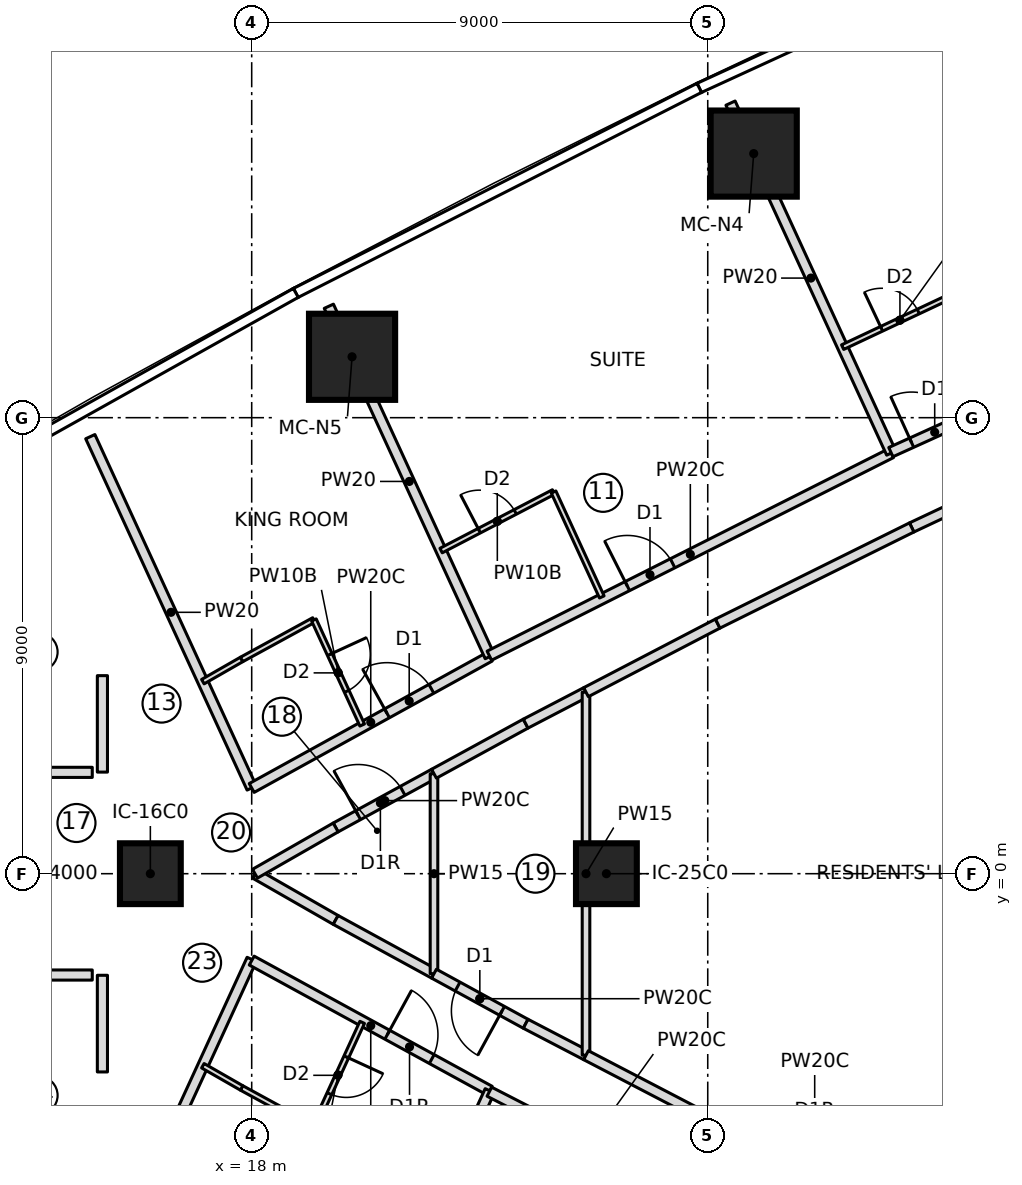
"""IFC4 building model, lengths in metres.
Left out: names, types, materials, properties, quantities, classifications, styles, units other than length and angle.
Written with IfcOpenShell. Run it as: python <this file> out.ifc"""

import sys

from ifc_helpers import new_model, si_unit, direction, frame, frame_2d, origin, origin_2d, place, context, subcontext, project, spatial, rectangle, extrude, element, fill, save


model = new_model("IFC4")
c1 = context("Model", 3, precision=1e-05, world=origin(), true_north=direction((0.0, 1.0)))
c2 = subcontext(c1, "Body", "Model", "MODEL_VIEW")
j1 = project(units=[si_unit("LENGTHUNIT", "METRE"), si_unit("PLANEANGLEUNIT", "RADIAN")], contexts=[c1])
p1 = place(None, origin())
s1 = spatial("IfcSite", under=j1, at=p1, CompositionType="ELEMENT")
p2 = place(p1, origin())
s2 = spatial("IfcBuilding", under=s1, at=p2, CompositionType="ELEMENT")
p3 = place(p2, frame((0.0, 0.0, 99.1)))
s3 = spatial("IfcBuildingStorey", under=s2, at=p3, CompositionType="ELEMENT", Elevation=99.1)
for number, where, z_axis, x_axis in (
    (1, (27.907, 14.212, 0.0), (0.0, 0.0, 1.0), (1.0, 0.0, 0.0)),
    (2, (19.981, 10.202, 0.0), (0.0, 0.0, 1.0), (1.0, 0.0, 0.0)),
):
    element("IfcColumn", number, at=place(p3, frame(where, z_axis=z_axis, x_axis=x_axis)), inside=s3, PredefinedType="COLUMN", context=c2, shape_type="SweptSolid", body=[
        extrude(rectangle(XDim=1.7, YDim=1.7, at=origin_2d()), origin(), (0.0, 0.0, 1.0), 3.55),
    ])
for number, where, z_axis, x_axis in (
    (3, (16.0, 0.0, 0.0), (0.0, 0.0, 1.0), (1.0, 0.0, 0.0)),
    (4, (25.0, 0.0, 0.0), (0.0, 0.0, 1.0), (1.0, 0.0, 0.0)),
):
    element("IfcColumn", number, at=place(p3, frame(where, z_axis=z_axis, x_axis=x_axis)), inside=s3, PredefinedType="COLUMN", context=c2, shape_type="SweptSolid", body=[
        extrude(rectangle(XDim=1.2, YDim=1.2, at=origin_2d()), origin(), (0.0, 0.0, 1.0), 3.55),
    ])
p4 = place(p3, frame((11.685, 2.0, 0.0), z_axis=(0.0, 0.0, 1.0), x_axis=(1.0, 0.0, 0.0)))
e5 = element("IfcWall", 5, at=p4, inside=s3, PredefinedType="PARTITIONING", context=c2, shape_type="SweptSolid", body=[
    extrude(rectangle(XDim=3.168, YDim=0.2, at=frame_2d((1.584, 0.0))), origin(), (0.0, 0.0, 1.0), 3.25),
])
p5 = place(p4, frame((1.084, 0.0, 0.0)))
e6 = element("IfcOpeningElement", 6, at=p5, cuts=e5, PredefinedType="OPENING", context=c2, shape_type="SweptSolid", body=[
    extrude(rectangle(XDim=1.0, YDim=2.1, at=frame_2d((0.5, 1.05))), frame((0.0, 0.11, 0.0), z_axis=(0.0, -1.0, 0.0), x_axis=(1.0, 0.0, 0.0)), (0.0, 0.0, 1.0), 0.22),
])
p6 = place(p3, frame((11.685, -2.0, 0.0), z_axis=(0.0, 0.0, 1.0), x_axis=(1.0, 0.0, 0.0)))
e7 = element("IfcWall", 7, at=p6, inside=s3, PredefinedType="PARTITIONING", context=c2, shape_type="SweptSolid", body=[
    extrude(rectangle(XDim=3.168, YDim=0.2, at=frame_2d((1.584, 0.0))), origin(), (0.0, 0.0, 1.0), 3.25),
])
p7 = place(p6, frame((1.084, 0.0, 0.0)))
e8 = element("IfcOpeningElement", 8, at=p7, cuts=e7, PredefinedType="OPENING", context=c2, shape_type="SweptSolid", body=[
    extrude(rectangle(XDim=1.0, YDim=2.1, at=frame_2d((0.5, 1.05))), frame((0.0, 0.11, 0.0), z_axis=(0.0, -1.0, 0.0), x_axis=(1.0, 0.0, 0.0)), (0.0, 0.0, 1.0), 0.22),
])
p8 = place(p3, frame((14.815, 8.626, 0.0), z_axis=(0.0, 0.0, 1.0), x_axis=(0.417432341259, -0.908708006166, 0.0)))
e9 = element("IfcWall", 9, at=p8, inside=s3, PredefinedType="PARTITIONING", context=c2, shape_type="SweptSolid", body=[
    extrude(rectangle(XDim=7.631, YDim=0.2, at=frame_2d((3.815, 0.0))), origin(), (0.0, 0.0, 1.0), 3.25),
])
p9 = place(p3, frame((18.0, 1.692, 0.0), z_axis=(0.0, 0.0, 1.0), x_axis=(0.875548487611, 0.483130257634, 0.0)))
e10 = element("IfcWall", 10, at=p9, inside=s3, PredefinedType="PARTITIONING", context=c2, shape_type="SweptSolid", body=[
    extrude(rectangle(XDim=5.367, YDim=0.2, at=frame_2d((2.683, 0.0))), origin(), (0.0, 0.0, 1.0), 3.25),
])
p10 = place(p9, frame((3.05, 0.0, 0.0)))
e11 = element("IfcOpeningElement", 11, at=p10, cuts=e10, PredefinedType="OPENING", context=c2, shape_type="SweptSolid", body=[
    extrude(rectangle(XDim=1.0, YDim=2.1, at=frame_2d((0.5, 1.05))), frame((0.0, 0.11, 0.0), z_axis=(0.0, -1.0, 0.0), x_axis=(1.0, 0.0, 0.0)), (0.0, 0.0, 1.0), 0.22),
])
p11 = place(p3, frame((17.036, 3.79, 0.0), z_axis=(0.0, 0.0, 1.0), x_axis=(0.867629162742, 0.497211862248, 0.0)))
e12 = element("IfcWall", 12, at=p11, inside=s3, PredefinedType="PARTITIONING", context=c2, shape_type="SweptSolid", body=[
    extrude(rectangle(XDim=0.882, YDim=0.1, at=frame_2d((0.441, 0.0))), origin(), (0.0, 0.0, 1.0), 3.25),
])
p12 = place(p3, frame((17.801, 4.229, 0.0), z_axis=(0.0, 0.0, 1.0), x_axis=(0.877424481957, 0.479714788663, 0.0)))
e13 = element("IfcWall", 13, at=p12, inside=s3, PredefinedType="PARTITIONING", context=c2, shape_type="SweptSolid", body=[
    extrude(rectangle(XDim=1.625, YDim=0.1, at=frame_2d((0.813, 0.0))), origin(), (0.0, 0.0, 1.0), 3.25),
])
p13 = place(p3, frame((19.228, 5.008, 0.0), z_axis=(0.0, 0.0, 1.0), x_axis=(0.417450047292, -0.908699872354, 0.0)))
e14 = element("IfcWall", 14, at=p13, inside=s3, PredefinedType="PARTITIONING", context=c2, shape_type="SweptSolid", body=[
    extrude(rectangle(XDim=2.283, YDim=0.1, at=frame_2d((1.141, 0.0))), origin(), (0.0, 0.0, 1.0), 3.25),
])
p14 = place(p13, frame((0.75, 0.0, 0.0)))
e15 = element("IfcOpeningElement", 15, at=p14, cuts=e14, PredefinedType="OPENING", context=c2, shape_type="SweptSolid", body=[
    extrude(rectangle(XDim=0.8, YDim=2.1, at=frame_2d((0.4, 1.05))), frame((0.0, 0.06, 0.0), z_axis=(0.0, -1.0, 0.0), x_axis=(1.0, 0.0, 0.0)), (0.0, 0.0, 1.0), 0.12),
])
p15 = place(p3, frame((22.699, 4.284, 0.0), z_axis=(0.0, 0.0, 1.0), x_axis=(-0.417413534969, 0.908716644959, 0.0)))
e16 = element("IfcWall", 16, at=p15, inside=s3, PredefinedType="PARTITIONING", context=c2, shape_type="SweptSolid", body=[
    extrude(rectangle(XDim=7.609, YDim=0.2, at=frame_2d((3.805, 0.0))), origin(), (0.0, 0.0, 1.0), 3.25),
])
p16 = place(p3, frame((22.69, 4.302, 0.0), z_axis=(0.0, 0.0, 1.0), x_axis=(0.892904919467, 0.450245271815, 0.0)))
e17 = element("IfcWall", 17, at=p16, inside=s3, PredefinedType="PARTITIONING", context=c2, shape_type="SweptSolid", body=[
    extrude(rectangle(XDim=8.883, YDim=0.2, at=frame_2d((4.441, 0.0))), origin(), (0.0, 0.0, 1.0), 3.25),
])
p17 = place(p16, frame((3.05, 0.0, 0.0)))
e18 = element("IfcOpeningElement", 18, at=p17, cuts=e17, PredefinedType="OPENING", context=c2, shape_type="SweptSolid", body=[
    extrude(rectangle(XDim=1.0, YDim=2.1, at=frame_2d((0.5, 1.05))), frame((0.0, 0.11, 0.0), z_axis=(0.0, -1.0, 0.0), x_axis=(1.0, 0.0, 0.0)), (0.0, 0.0, 1.0), 0.22),
])
p18 = place(p3, frame((21.738, 6.377, 0.0), z_axis=(0.0, 0.0, 1.0), x_axis=(0.886911586599, 0.461939214135, 0.0)))
e19 = element("IfcWall", 19, at=p18, inside=s3, PredefinedType="PARTITIONING", context=c2, shape_type="SweptSolid", body=[
    extrude(rectangle(XDim=2.503, YDim=0.1, at=frame_2d((1.251, 0.0))), origin(), (0.0, 0.0, 1.0), 3.25),
])
p19 = place(p18, frame((0.85, 0.0, 0.0)))
e20 = element("IfcOpeningElement", 20, at=p19, cuts=e19, PredefinedType="OPENING", context=c2, shape_type="SweptSolid", body=[
    extrude(rectangle(XDim=0.8, YDim=2.1, at=frame_2d((0.4, 1.05))), frame((0.0, 0.06, 0.0), z_axis=(0.0, -1.0, 0.0), x_axis=(1.0, 0.0, 0.0)), (0.0, 0.0, 1.0), 0.12),
])
p20 = place(p3, frame((23.958, 7.533, 0.0), z_axis=(0.0, 0.0, 1.0), x_axis=(0.417454762401, -0.908697706253, 0.0)))
e21 = element("IfcWall", 21, at=p20, inside=s3, PredefinedType="PARTITIONING", context=c2, shape_type="SweptSolid", body=[
    extrude(rectangle(XDim=2.28, YDim=0.1, at=frame_2d((1.14, 0.0))), origin(), (0.0, 0.0, 1.0), 3.25),
])
p21 = place(p3, frame((30.622, 8.302, 0.0), z_axis=(0.0, 0.0, 1.0), x_axis=(-0.417429919618, 0.90870911859, 0.0)))
e22 = element("IfcWall", 22, at=p21, inside=s3, PredefinedType="PARTITIONING", context=c2, shape_type="SweptSolid", body=[
    extrude(rectangle(XDim=7.6, YDim=0.2, at=frame_2d((3.8, 0.0))), origin(), (0.0, 0.0, 1.0), 3.25),
])
p22 = place(p3, frame((30.614, 8.32, 0.0), z_axis=(0.0, 0.0, 1.0), x_axis=(0.910751030363, 0.41295588226, 0.0)))
e23 = element("IfcWall", 23, at=p22, inside=s3, PredefinedType="PARTITIONING", context=c2, shape_type="SweptSolid", body=[
    extrude(rectangle(XDim=8.883, YDim=0.2, at=frame_2d((4.442, 0.0))), origin(), (0.0, 0.0, 1.0), 3.25),
])
p23 = place(p22, frame((0.45, 0.0, 0.0)))
e24 = element("IfcOpeningElement", 24, at=p23, cuts=e23, PredefinedType="OPENING", context=c2, shape_type="SweptSolid", body=[
    extrude(rectangle(XDim=1.0, YDim=2.1, at=frame_2d((0.5, 1.05))), frame((0.0, 0.11, 0.0), z_axis=(0.0, -1.0, 0.0), x_axis=(1.0, 0.0, 0.0)), (0.0, 0.0, 1.0), 0.22),
])
p24 = place(p3, frame((29.662, 10.392, 0.0), z_axis=(0.0, 0.0, 1.0), x_axis=(0.904688082375, 0.426074493027, 0.0)))
e25 = element("IfcWall", 25, at=p24, inside=s3, PredefinedType="PARTITIONING", context=c2, shape_type="SweptSolid", body=[
    extrude(rectangle(XDim=2.5, YDim=0.1, at=frame_2d((1.25, 0.0))), origin(), (0.0, 0.0, 1.0), 3.25),
])
p25 = place(p24, frame((0.85, 0.0, 0.0)))
e26 = element("IfcOpeningElement", 26, at=p25, cuts=e25, PredefinedType="OPENING", context=c2, shape_type="SweptSolid", body=[
    extrude(rectangle(XDim=0.8, YDim=2.1, at=frame_2d((0.4, 1.05))), frame((0.0, 0.06, 0.0), z_axis=(0.0, -1.0, 0.0), x_axis=(1.0, 0.0, 0.0)), (0.0, 0.0, 1.0), 0.12),
])
p26 = place(p3, frame((14.815, -8.626, 0.0), z_axis=(0.0, 0.0, 1.0), x_axis=(0.417432341259, 0.908708006166, 0.0)))
e27 = element("IfcWall", 27, at=p26, inside=s3, PredefinedType="PARTITIONING", context=c2, shape_type="SweptSolid", body=[
    extrude(rectangle(XDim=7.631, YDim=0.2, at=frame_2d((3.815, 0.0))), origin(), (0.0, 0.0, 1.0), 3.25),
])
p27 = place(p3, frame((18.0, -1.715, 0.0), z_axis=(0.0, 0.0, 1.0), x_axis=(0.877354946945, -0.479841950096, 0.0)))
e28 = element("IfcWall", 28, at=p27, inside=s3, PredefinedType="PARTITIONING", context=c2, shape_type="SweptSolid", body=[
    extrude(rectangle(XDim=5.355, YDim=0.2, at=frame_2d((2.678, 0.0))), origin(), (0.0, 0.0, 1.0), 3.25),
])
p28 = place(p27, frame((3.05, 0.0, 0.0)))
e29 = element("IfcOpeningElement", 29, at=p28, cuts=e28, PredefinedType="OPENING", context=c2, shape_type="SweptSolid", body=[
    extrude(rectangle(XDim=1.0, YDim=2.1, at=frame_2d((0.5, 1.05))), frame((0.0, 0.11, 0.0), z_axis=(0.0, -1.0, 0.0), x_axis=(1.0, 0.0, 0.0)), (0.0, 0.0, 1.0), 0.22),
])
p29 = place(p3, frame((20.18, -2.934, 0.0), z_axis=(0.0, 0.0, 1.0), x_axis=(-0.417450047292, -0.908699872354, 0.0)))
e30 = element("IfcWall", 30, at=p29, inside=s3, PredefinedType="PARTITIONING", context=c2, shape_type="SweptSolid", body=[
    extrude(rectangle(XDim=2.283, YDim=0.1, at=frame_2d((1.141, 0.0))), origin(), (0.0, 0.0, 1.0), 3.25),
])
p30 = place(p29, frame((0.75, 0.0, 0.0)))
e31 = element("IfcOpeningElement", 31, at=p30, cuts=e30, PredefinedType="OPENING", context=c2, shape_type="SweptSolid", body=[
    extrude(rectangle(XDim=0.8, YDim=2.1, at=frame_2d((0.4, 1.05))), frame((0.0, 0.06, 0.0), z_axis=(0.0, -1.0, 0.0), x_axis=(1.0, 0.0, 0.0)), (0.0, 0.0, 1.0), 0.12),
])
p31 = place(p3, frame((19.228, -5.008, 0.0), z_axis=(0.0, 0.0, 1.0), x_axis=(-0.877424481957, 0.479714788663, 0.0)))
e32 = element("IfcWall", 32, at=p31, inside=s3, PredefinedType="PARTITIONING", context=c2, shape_type="SweptSolid", body=[
    extrude(rectangle(XDim=1.625, YDim=0.1, at=frame_2d((0.813, 0.0))), origin(), (0.0, 0.0, 1.0), 3.25),
])
p32 = place(p3, frame((17.801, -4.229, 0.0), z_axis=(0.0, 0.0, 1.0), x_axis=(-0.867629162742, 0.497211862248, 0.0)))
e33 = element("IfcWall", 33, at=p32, inside=s3, PredefinedType="PARTITIONING", context=c2, shape_type="SweptSolid", body=[
    extrude(rectangle(XDim=0.882, YDim=0.1, at=frame_2d((0.441, 0.0))), origin(), (0.0, 0.0, 1.0), 3.25),
])
p33 = place(p3, frame((19.522, -11.199, 0.0), z_axis=(0.0, 0.0, 1.0), x_axis=(0.417413534969, 0.908716644959, 0.0)))
e34 = element("IfcWall", 34, at=p33, inside=s3, PredefinedType="PARTITIONING", context=c2, shape_type="SweptSolid", body=[
    extrude(rectangle(XDim=7.609, YDim=0.2, at=frame_2d((3.805, 0.0))), origin(), (0.0, 0.0, 1.0), 3.25),
])
p34 = place(p3, frame((22.69, -4.302, 0.0), z_axis=(0.0, 0.0, 1.0), x_axis=(0.889236075961, -0.457448577667, 0.0)))
e35 = element("IfcWall", 35, at=p34, inside=s3, PredefinedType="PARTITIONING", context=c2, shape_type="SweptSolid", body=[
    extrude(rectangle(XDim=4.443, YDim=0.2, at=frame_2d((2.222, 0.0))), origin(), (0.0, 0.0, 1.0), 3.25),
])
p35 = place(p34, frame((3.05, 0.0, 0.0)))
e36 = element("IfcOpeningElement", 36, at=p35, cuts=e35, PredefinedType="OPENING", context=c2, shape_type="SweptSolid", body=[
    extrude(rectangle(XDim=1.0, YDim=2.1, at=frame_2d((0.5, 1.05))), frame((0.0, 0.11, 0.0), z_axis=(0.0, -1.0, 0.0), x_axis=(1.0, 0.0, 0.0)), (0.0, 0.0, 1.0), 0.22),
])
p36 = place(p3, frame((19.657, 0.912, 0.0), z_axis=(0.0, 0.0, 1.0), x_axis=(0.877490210137, 0.479594548671, 0.0)))
e37 = element("IfcWall", 37, at=p36, inside=s3, PredefinedType="PARTITIONING", context=c2, shape_type="SweptSolid", body=[
    extrude(rectangle(XDim=2.211, YDim=0.2, at=frame_2d((1.106, 0.0))), origin(), (0.0, 0.0, 1.0), 3.25),
])
p37 = place(p36, frame((0.506, 0.0, 0.0)))
e38 = element("IfcOpeningElement", 38, at=p37, cuts=e37, PredefinedType="OPENING", context=c2, shape_type="SweptSolid", body=[
    extrude(rectangle(XDim=1.0, YDim=2.1, at=frame_2d((0.5, 1.05))), frame((0.0, 0.11, 0.0), z_axis=(0.0, -1.0, 0.0), x_axis=(1.0, 0.0, 0.0)), (0.0, 0.0, 1.0), 0.22),
])
for number, where, z_axis, x_axis in (
    (39, (19.657, -0.912, 0.0), (0.0, 0.0, 1.0), (-0.868, 0.497, 0.0)),
    (40, (18.065, 0.0, 0.0), (0.0, 0.0, 1.0), (0.868, 0.497, 0.0)),
):
    element("IfcWall", number, at=place(p3, frame(where, z_axis=z_axis, x_axis=x_axis)), inside=s3, PredefinedType="PARTITIONING", context=c2, shape_type="SweptSolid", body=[
        extrude(rectangle(XDim=1.835, YDim=0.2, at=frame_2d((0.918, 0.0))), origin(), (0.0, 0.0, 1.0), 3.25),
    ])
p38 = place(p3, frame((21.598, -1.973, 0.0), z_axis=(0.0, 0.0, 1.0), x_axis=(-0.877490210137, 0.479594548671, 0.0)))
e41 = element("IfcWall", 41, at=p38, inside=s3, PredefinedType="PARTITIONING", context=c2, shape_type="SweptSolid", body=[
    extrude(rectangle(XDim=2.211, YDim=0.2, at=frame_2d((1.106, 0.0))), origin(), (0.0, 0.0, 1.0), 3.25),
])
p39 = place(p3, frame((21.598, -1.973, 0.0), z_axis=(0.0, 0.0, 1.0), x_axis=(0.0, 1.0, 0.0)))
e42 = element("IfcWall", 42, at=p39, inside=s3, PredefinedType="PARTITIONING", context=c2, shape_type="SweptSolid", body=[
    extrude(rectangle(XDim=3.946, YDim=0.15, at=frame_2d((1.973, 0.0))), origin(), (0.0, 0.0, 1.0), 3.25),
])
p40 = place(p3, frame((23.407, -2.962, 0.0), z_axis=(0.0, 0.0, 1.0), x_axis=(-0.877438115071, 0.479689852113, 0.0)))
e43 = element("IfcWall", 43, at=p40, inside=s3, PredefinedType="PARTITIONING", context=c2, shape_type="SweptSolid", body=[
    extrude(rectangle(XDim=2.062, YDim=0.2, at=frame_2d((1.031, 0.0))), origin(), (0.0, 0.0, 1.0), 3.25),
])
p41 = place(p40, frame((0.531, 0.0, 0.0)))
e44 = element("IfcOpeningElement", 44, at=p41, cuts=e43, PredefinedType="OPENING", context=c2, shape_type="SweptSolid", body=[
    extrude(rectangle(XDim=1.0, YDim=2.1, at=frame_2d((0.5, 1.05))), frame((0.0, 0.11, 0.0), z_axis=(0.0, -1.0, 0.0), x_axis=(1.0, 0.0, 0.0)), (0.0, 0.0, 1.0), 0.22),
])
p42 = place(p3, frame((21.598, 1.973, 0.0), z_axis=(0.0, 0.0, 1.0), x_axis=(0.877438115071, 0.479689852113, 0.0)))
e45 = element("IfcWall", 45, at=p42, inside=s3, PredefinedType="PARTITIONING", context=c2, shape_type="SweptSolid", body=[
    extrude(rectangle(XDim=2.062, YDim=0.2, at=frame_2d((1.031, 0.0))), origin(), (0.0, 0.0, 1.0), 3.25),
])
for number, where, z_axis, x_axis in (
    (46, (23.407, 2.962, 0.0), (0.0, 0.0, 1.0), (0.887, 0.462, 0.0)),
    (47, (24.598, -3.582, 0.0), (0.0, 0.0, 1.0), (-0.887, 0.462, 0.0)),
):
    element("IfcWall", number, at=place(p3, frame(where, z_axis=z_axis, x_axis=x_axis)), inside=s3, PredefinedType="PARTITIONING", context=c2, shape_type="SweptSolid", body=[
        extrude(rectangle(XDim=1.343, YDim=0.2, at=frame_2d((0.671, 0.0))), origin(), (0.0, 0.0, 1.0), 3.25),
    ])
p43 = place(p3, frame((24.598, -3.582, 0.0), z_axis=(0.0, 0.0, 1.0), x_axis=(0.0, 1.0, 0.0)))
e48 = element("IfcWall", 48, at=p43, inside=s3, PredefinedType="PARTITIONING", context=c2, shape_type="SweptSolid", body=[
    extrude(rectangle(XDim=7.165, YDim=0.15, at=frame_2d((3.582, 0.0))), origin(), (0.0, 0.0, 1.0), 3.25),
])
p44 = place(p3, frame((31.025, 6.833, 0.0), z_axis=(0.0, 0.0, 1.0), x_axis=(0.904690325494, 0.426069730159, 0.0)))
e49 = element("IfcWall", 49, at=p44, inside=s3, PredefinedType="PARTITIONING", context=c2, shape_type="SweptSolid", body=[
    extrude(rectangle(XDim=1.078, YDim=0.2, at=frame_2d((0.539, 0.0))), origin(), (0.0, 0.0, 1.0), 3.25),
])
for number, where, z_axis, x_axis in (
    (50, (27.196, -4.936, 0.0), (0.0, 0.0, 1.0), (-0.887, 0.462, 0.0)),
    (51, (24.598, 3.582, 0.0), (0.0, 0.0, 1.0), (0.887, 0.462, 0.0)),
):
    element("IfcWall", number, at=place(p3, frame(where, z_axis=z_axis, x_axis=x_axis)), inside=s3, PredefinedType="PARTITIONING", context=c2, shape_type="SweptSolid", body=[
        extrude(rectangle(XDim=2.93, YDim=0.2, at=frame_2d((1.465, 0.0))), origin(), (0.0, 0.0, 1.0), 3.25),
    ])
p45 = place(p3, frame((27.196, 4.936, 0.0), z_axis=(0.0, 0.0, 1.0), x_axis=(0.895975836328, 0.44410280422, 0.0)))
e52 = element("IfcWall", 52, at=p45, inside=s3, PredefinedType="PARTITIONING", context=c2, shape_type="SweptSolid", body=[
    extrude(rectangle(XDim=4.273, YDim=0.2, at=frame_2d((2.137, 0.0))), origin(), (0.0, 0.0, 1.0), 3.25),
])
p46 = place(p3, frame((15.054, 3.909, 0.0), z_axis=(0.0, 0.0, 1.0), x_axis=(0.0, -1.0, 0.0)))
e53 = element("IfcWall", 53, at=p46, inside=s3, PredefinedType="PARTITIONING", context=c2, shape_type="SweptSolid", body=[
    extrude(rectangle(XDim=1.904, YDim=0.2, at=frame_2d((0.952, 0.0))), origin(), (0.0, 0.0, 1.0), 3.25),
])
p47 = place(p3, frame((15.054, -2.005, 0.0), z_axis=(0.0, 0.0, 1.0), x_axis=(0.0, -1.0, 0.0)))
e54 = element("IfcWall", 54, at=p47, inside=s3, PredefinedType="PARTITIONING", context=c2, shape_type="SweptSolid", body=[
    extrude(rectangle(XDim=1.908, YDim=0.2, at=frame_2d((0.954, 0.0))), origin(), (0.0, 0.0, 1.0), 3.25),
])
p48 = place(p14, origin())
e55 = element("IfcDoor", 55, at=p48, inside=s3, OperationType="SINGLE_SWING_LEFT", PredefinedType="DOOR", context=c2, shape_type="SweptSolid", body=[
    extrude(rectangle(XDim=0.8, YDim=2.1, at=frame_2d((0.4, 1.05))), frame((0.0, 0.025, 0.0), z_axis=(0.0, -1.0, 0.0), x_axis=(1.0, 0.0, 0.0)), (0.0, 0.0, 1.0), 0.05),
])
fill(e15, e55)
p49 = place(p10, origin())
e56 = element("IfcDoor", 56, at=p49, inside=s3, OperationType="SINGLE_SWING_LEFT", PredefinedType="DOOR", context=c2, shape_type="SweptSolid", body=[
    extrude(rectangle(XDim=1.0, YDim=2.1, at=frame_2d((0.5, 1.05))), frame((0.0, 0.025, 0.0), z_axis=(0.0, -1.0, 0.0), x_axis=(1.0, 0.0, 0.0)), (0.0, 0.0, 1.0), 0.05),
])
fill(e11, e56)
p50 = place(p19, origin())
e57 = element("IfcDoor", 57, at=p50, inside=s3, OperationType="SINGLE_SWING_LEFT", PredefinedType="DOOR", context=c2, shape_type="SweptSolid", body=[
    extrude(rectangle(XDim=0.8, YDim=2.1, at=frame_2d((0.4, 1.05))), frame((0.0, 0.025, 0.0), z_axis=(0.0, -1.0, 0.0), x_axis=(1.0, 0.0, 0.0)), (0.0, 0.0, 1.0), 0.05),
])
fill(e20, e57)
p51 = place(p17, origin())
e58 = element("IfcDoor", 58, at=p51, inside=s3, OperationType="SINGLE_SWING_LEFT", PredefinedType="DOOR", context=c2, shape_type="SweptSolid", body=[
    extrude(rectangle(XDim=1.0, YDim=2.1, at=frame_2d((0.5, 1.05))), frame((0.0, 0.025, 0.0), z_axis=(0.0, -1.0, 0.0), x_axis=(1.0, 0.0, 0.0)), (0.0, 0.0, 1.0), 0.05),
])
fill(e18, e58)
p52 = place(p25, origin())
e59 = element("IfcDoor", 59, at=p52, inside=s3, OperationType="SINGLE_SWING_LEFT", PredefinedType="DOOR", context=c2, shape_type="SweptSolid", body=[
    extrude(rectangle(XDim=0.8, YDim=2.1, at=frame_2d((0.4, 1.05))), frame((0.0, 0.025, 0.0), z_axis=(0.0, -1.0, 0.0), x_axis=(1.0, 0.0, 0.0)), (0.0, 0.0, 1.0), 0.05),
])
fill(e26, e59)
p53 = place(p23, origin())
e60 = element("IfcDoor", 60, at=p53, inside=s3, OperationType="SINGLE_SWING_LEFT", PredefinedType="DOOR", context=c2, shape_type="SweptSolid", body=[
    extrude(rectangle(XDim=1.0, YDim=2.1, at=frame_2d((0.5, 1.05))), frame((0.0, 0.025, 0.0), z_axis=(0.0, -1.0, 0.0), x_axis=(1.0, 0.0, 0.0)), (0.0, 0.0, 1.0), 0.05),
])
fill(e24, e60)
p54 = place(p30, origin())
e61 = element("IfcDoor", 61, at=p54, inside=s3, OperationType="SINGLE_SWING_LEFT", PredefinedType="DOOR", context=c2, shape_type="SweptSolid", body=[
    extrude(rectangle(XDim=0.8, YDim=2.1, at=frame_2d((0.4, 1.05))), frame((0.0, 0.025, 0.0), z_axis=(0.0, -1.0, 0.0), x_axis=(1.0, 0.0, 0.0)), (0.0, 0.0, 1.0), 0.05),
])
fill(e31, e61)
p55 = place(p28, origin())
e62 = element("IfcDoor", 62, at=p55, inside=s3, OperationType="SINGLE_SWING_RIGHT", PredefinedType="DOOR", context=c2, shape_type="SweptSolid", body=[
    extrude(rectangle(XDim=1.0, YDim=2.1, at=frame_2d((0.5, 1.05))), frame((0.0, 0.025, 0.0), z_axis=(0.0, -1.0, 0.0), x_axis=(1.0, 0.0, 0.0)), (0.0, 0.0, 1.0), 0.05),
])
fill(e29, e62)
p56 = place(p37, origin())
e63 = element("IfcDoor", 63, at=p56, inside=s3, OperationType="SINGLE_SWING_RIGHT", PredefinedType="DOOR", context=c2, shape_type="SweptSolid", body=[
    extrude(rectangle(XDim=1.0, YDim=2.1, at=frame_2d((0.5, 1.05))), frame((0.0, 0.025, 0.0), z_axis=(0.0, -1.0, 0.0), x_axis=(1.0, 0.0, 0.0)), (0.0, 0.0, 1.0), 0.05),
])
fill(e38, e63)
p57 = place(p41, origin())
e64 = element("IfcDoor", 64, at=p57, inside=s3, OperationType="SINGLE_SWING_LEFT", PredefinedType="DOOR", context=c2, shape_type="SweptSolid", body=[
    extrude(rectangle(XDim=1.0, YDim=2.1, at=frame_2d((0.5, 1.05))), frame((0.0, 0.025, 0.0), z_axis=(0.0, -1.0, 0.0), x_axis=(1.0, 0.0, 0.0)), (0.0, 0.0, 1.0), 0.05),
])
fill(e44, e64)
save(model, sys.argv[1])
